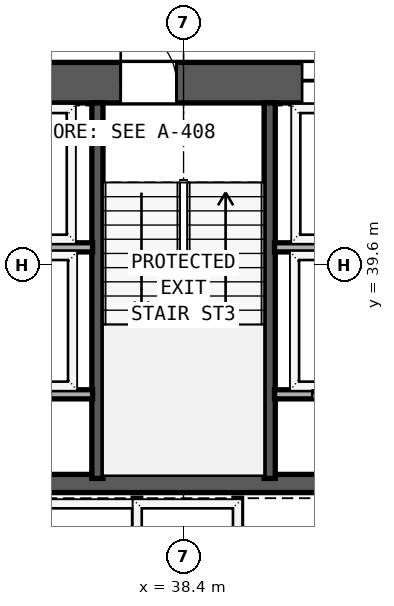
"""IFC4 building model, lengths in metres.
Left out: names, types, materials, properties, quantities, classifications, styles, units other than length and angle.
Written with IfcOpenShell. Run it as: python <this file> out.ifc"""

import sys

from ifc_helpers import new_model, si_unit, direction, frame, frame_2d, origin, place, context, subcontext, project, spatial, rectangle, extrude, element, fill, save


model = new_model("IFC4")
c1 = context("Model", 3, precision=1e-05, world=origin(), true_north=direction((0.0, 1.0)))
c2 = subcontext(c1, "Body", "Model", "MODEL_VIEW")
j1 = project(units=[si_unit("LENGTHUNIT", "METRE"), si_unit("PLANEANGLEUNIT", "RADIAN")], contexts=[c1])
p1 = place(None, origin())
s1 = spatial("IfcSite", under=j1, at=p1, CompositionType="ELEMENT")
p2 = place(p1, origin())
s2 = spatial("IfcBuilding", under=s1, at=p2, CompositionType="ELEMENT")
p3 = place(p2, frame((0.0, 0.0, 85.6)))
s3 = spatial("IfcBuildingStorey", under=s2, at=p3, CompositionType="ELEMENT", Elevation=85.6)
p4 = place(p3, frame((29.6, 43.2, 0.0), z_axis=(0.0, 0.0, 1.0), x_axis=(1.0, 0.0, 0.0)))
e1 = element("IfcWall", 1, at=p4, inside=s3, PredefinedType="SHEAR", context=c2, shape_type="SweptSolid", body=[
    extrude(rectangle(XDim=17.6, YDim=0.8, at=frame_2d((8.8, 0.0))), origin(), (0.0, 0.0, 1.0), 3.54),
])
p5 = place(p4, frame((2.45, 0.0, 0.0)))
e2 = element("IfcOpeningElement", 2, at=p5, cuts=e1, PredefinedType="OPENING", context=c2, shape_type="SweptSolid", body=[
    extrude(rectangle(XDim=1.1, YDim=2.15, at=frame_2d((0.55, 1.075))), frame((0.0, 0.41, 0.0), z_axis=(0.0, -1.0, 0.0), x_axis=(1.0, 0.0, 0.0)), (0.0, 0.0, 1.0), 0.82),
])
p6 = place(p4, frame((7.56, 0.0, 0.0)))
e3 = element("IfcOpeningElement", 3, at=p6, cuts=e1, PredefinedType="OPENING", context=c2, shape_type="SweptSolid", body=[
    extrude(rectangle(XDim=1.1, YDim=2.15, at=frame_2d((0.55, 1.075))), frame((0.0, 0.41, 0.0), z_axis=(0.0, -1.0, 0.0), x_axis=(1.0, 0.0, 0.0)), (0.0, 0.0, 1.0), 0.82),
])
p7 = place(p4, frame((13.65, 0.0, 0.0)))
e4 = element("IfcOpeningElement", 4, at=p7, cuts=e1, PredefinedType="OPENING", context=c2, shape_type="SweptSolid", body=[
    extrude(rectangle(XDim=1.1, YDim=2.15, at=frame_2d((0.55, 1.075))), frame((0.0, 0.41, 0.0), z_axis=(0.0, -1.0, 0.0), x_axis=(1.0, 0.0, 0.0)), (0.0, 0.0, 1.0), 0.82),
])
p8 = place(p4, frame((4.78, 0.0, 0.0)))
e5 = element("IfcOpeningElement", 5, at=p8, cuts=e1, PredefinedType="OPENING", context=c2, shape_type="SweptSolid", body=[
    extrude(rectangle(XDim=1.1, YDim=2.2, at=frame_2d((0.55, 1.1))), frame((0.0, 0.41, 0.0), z_axis=(0.0, -1.0, 0.0), x_axis=(1.0, 0.0, 0.0)), (0.0, 0.0, 1.0), 0.82),
])
p9 = place(p4, frame((11.14, 0.0, 0.0)))
e6 = element("IfcOpeningElement", 6, at=p9, cuts=e1, PredefinedType="OPENING", context=c2, shape_type="SweptSolid", body=[
    extrude(rectangle(XDim=1.1, YDim=2.2, at=frame_2d((0.55, 1.1))), frame((0.0, 0.41, 0.0), z_axis=(0.0, -1.0, 0.0), x_axis=(1.0, 0.0, 0.0)), (0.0, 0.0, 1.0), 0.82),
])
p10 = place(p3, frame((30.4, 35.29, 0.0), z_axis=(0.0, 0.0, 1.0), x_axis=(1.0, 0.0, 0.0)))
e7 = element("IfcWall", 7, at=p10, inside=s3, PredefinedType="SHEAR", context=c2, shape_type="SweptSolid", body=[
    extrude(rectangle(XDim=16.0, YDim=0.36, at=frame_2d((8.0, 0.0))), origin(), (0.0, 0.0, 1.0), 3.54),
])
p11 = place(p10, frame((4.95, 0.0, 0.0), z_axis=(0.0, 0.0, 1.0), x_axis=(-1.0, 0.0, 0.0)))
e8 = element("IfcOpeningElement", 8, at=p11, cuts=e7, PredefinedType="OPENING", context=c2, shape_type="SweptSolid", body=[
    extrude(rectangle(XDim=0.9, YDim=2.1, at=frame_2d((0.45, 1.05))), frame((0.0, 0.19, 0.0), z_axis=(0.0, -1.0, 0.0), x_axis=(1.0, 0.0, 0.0)), (0.0, 0.0, 1.0), 0.38),
])
p12 = place(p10, frame((12.01, 0.0, 0.0), z_axis=(0.0, 0.0, 1.0), x_axis=(-1.0, 0.0, 0.0)))
e9 = element("IfcOpeningElement", 9, at=p12, cuts=e7, PredefinedType="OPENING", context=c2, shape_type="SweptSolid", body=[
    extrude(rectangle(XDim=0.9, YDim=2.1, at=frame_2d((0.45, 1.05))), frame((0.0, 0.19, 0.0), z_axis=(0.0, -1.0, 0.0), x_axis=(1.0, 0.0, 0.0)), (0.0, 0.0, 1.0), 0.38),
])
for number, where, z_axis, x_axis in (
    (10, (36.7, 35.39, 0.0), (0.0, 0.0, 1.0), (0.0, 1.0, 0.0)),
    (11, (40.1, 35.39, 0.0), (0.0, 0.0, 1.0), (0.0, 1.0, 0.0)),
):
    element("IfcWall", number, at=place(p3, frame(where, z_axis=z_axis, x_axis=x_axis)), inside=s3, PredefinedType="SHEAR", context=c2, shape_type="SweptSolid", body=[
        extrude(rectangle(XDim=7.41, YDim=0.22, at=frame_2d((3.705, 0.0))), origin(), (0.0, 0.0, 1.0), 3.54),
    ])
for number, where, z_axis, x_axis in (
    (12, (33.835, 39.95, 0.0), (0.0, 0.0, 1.0), (1.0, 0.0, 0.0)),
    (13, (40.195, 39.95, 0.0), (0.0, 0.0, 1.0), (1.0, 0.0, 0.0)),
):
    element("IfcWall", number, at=place(p3, frame(where, z_axis=z_axis, x_axis=x_axis)), inside=s3, PredefinedType="SOLIDWALL", context=c2, shape_type="SweptSolid", body=[
        extrude(rectangle(XDim=2.77, YDim=0.18, at=frame_2d((1.385, 0.0))), origin(), (0.0, 0.0, 1.0), 3.54),
    ])
p13 = place(p3, frame((33.835, 37.05, 0.0), z_axis=(0.0, 0.0, 1.0), x_axis=(1.0, 0.0, 0.0)))
e14 = element("IfcWall", 14, at=p13, inside=s3, PredefinedType="SOLIDWALL", context=c2, shape_type="SweptSolid", body=[
    extrude(rectangle(XDim=2.77, YDim=0.18, at=frame_2d((1.385, 0.0))), origin(), (0.0, 0.0, 1.0), 3.54),
])
p14 = place(p13, frame((1.945, 0.0, 0.0), z_axis=(0.0, 0.0, 1.0), x_axis=(-1.0, 0.0, 0.0)))
e15 = element("IfcOpeningElement", 15, at=p14, cuts=e14, PredefinedType="OPENING", context=c2, shape_type="SweptSolid", body=[
    extrude(rectangle(XDim=1.2, YDim=2.2, at=frame_2d((0.6, 1.1))), frame((0.0, 0.1, 0.0), z_axis=(0.0, -1.0, 0.0), x_axis=(1.0, 0.0, 0.0)), (0.0, 0.0, 1.0), 0.2),
])
p15 = place(p3, frame((40.195, 37.05, 0.0), z_axis=(0.0, 0.0, 1.0), x_axis=(1.0, 0.0, 0.0)))
e16 = element("IfcWall", 16, at=p15, inside=s3, PredefinedType="SOLIDWALL", context=c2, shape_type="SweptSolid", body=[
    extrude(rectangle(XDim=2.77, YDim=0.18, at=frame_2d((1.385, 0.0))), origin(), (0.0, 0.0, 1.0), 3.54),
])
p16 = place(p15, frame((1.945, 0.0, 0.0), z_axis=(0.0, 0.0, 1.0), x_axis=(-1.0, 0.0, 0.0)))
e17 = element("IfcOpeningElement", 17, at=p16, cuts=e16, PredefinedType="OPENING", context=c2, shape_type="SweptSolid", body=[
    extrude(rectangle(XDim=1.2, YDim=2.2, at=frame_2d((0.6, 1.1))), frame((0.0, 0.1, 0.0), z_axis=(0.0, -1.0, 0.0), x_axis=(1.0, 0.0, 0.0)), (0.0, 0.0, 1.0), 0.2),
])
for number, where, z_axis, x_axis in (
    (18, (37.48, 32.95, 0.0), (0.0, 0.0, 1.0), (0.0, 1.0, 0.0)),
    (19, (39.47, 32.95, 0.0), (0.0, 0.0, 1.0), (0.0, 1.0, 0.0)),
):
    element("IfcWall", number, at=place(p3, frame(where, z_axis=z_axis, x_axis=x_axis)), inside=s3, PredefinedType="SOLIDWALL", context=c2, shape_type="SweptSolid", body=[
        extrude(rectangle(XDim=2.05, YDim=0.15, at=frame_2d((1.025, 0.0))), origin(), (0.0, 0.0, 1.0), 3.54),
    ])
p17 = place(p6, origin())
e20 = element("IfcDoor", 20, at=p17, inside=s3, OperationType="SINGLE_SWING_LEFT", PredefinedType="DOOR", context=c2, shape_type="SweptSolid", body=[
    extrude(rectangle(XDim=1.1, YDim=2.15, at=frame_2d((0.55, 1.075))), frame((0.0, 0.185, 0.0), z_axis=(0.0, -1.0, 0.0), x_axis=(1.0, 0.0, 0.0)), (0.0, 0.0, 1.0), 0.05),
])
fill(e3, e20)
p18 = place(p9, origin())
e21 = element("IfcDoor", 21, at=p18, inside=s3, OperationType="SLIDING_TO_LEFT", PredefinedType="DOOR", context=c2, shape_type="SweptSolid", body=[
    extrude(rectangle(XDim=1.1, YDim=2.2, at=frame_2d((0.55, 1.1))), frame((0.0, 0.185, 0.0), z_axis=(0.0, -1.0, 0.0), x_axis=(1.0, 0.0, 0.0)), (0.0, 0.0, 1.0), 0.05),
])
fill(e6, e21)
p19 = place(p16, origin())
e22 = element("IfcDoor", 22, at=p19, inside=s3, OperationType="SLIDING_TO_RIGHT", PredefinedType="DOOR", context=c2, shape_type="SweptSolid", body=[
    extrude(rectangle(XDim=1.2, YDim=2.2, at=frame_2d((0.6, 1.1))), frame((0.0, 0.025, 0.0), z_axis=(0.0, -1.0, 0.0), x_axis=(1.0, 0.0, 0.0)), (0.0, 0.0, 1.0), 0.05),
])
fill(e17, e22)
save(model, sys.argv[1])
